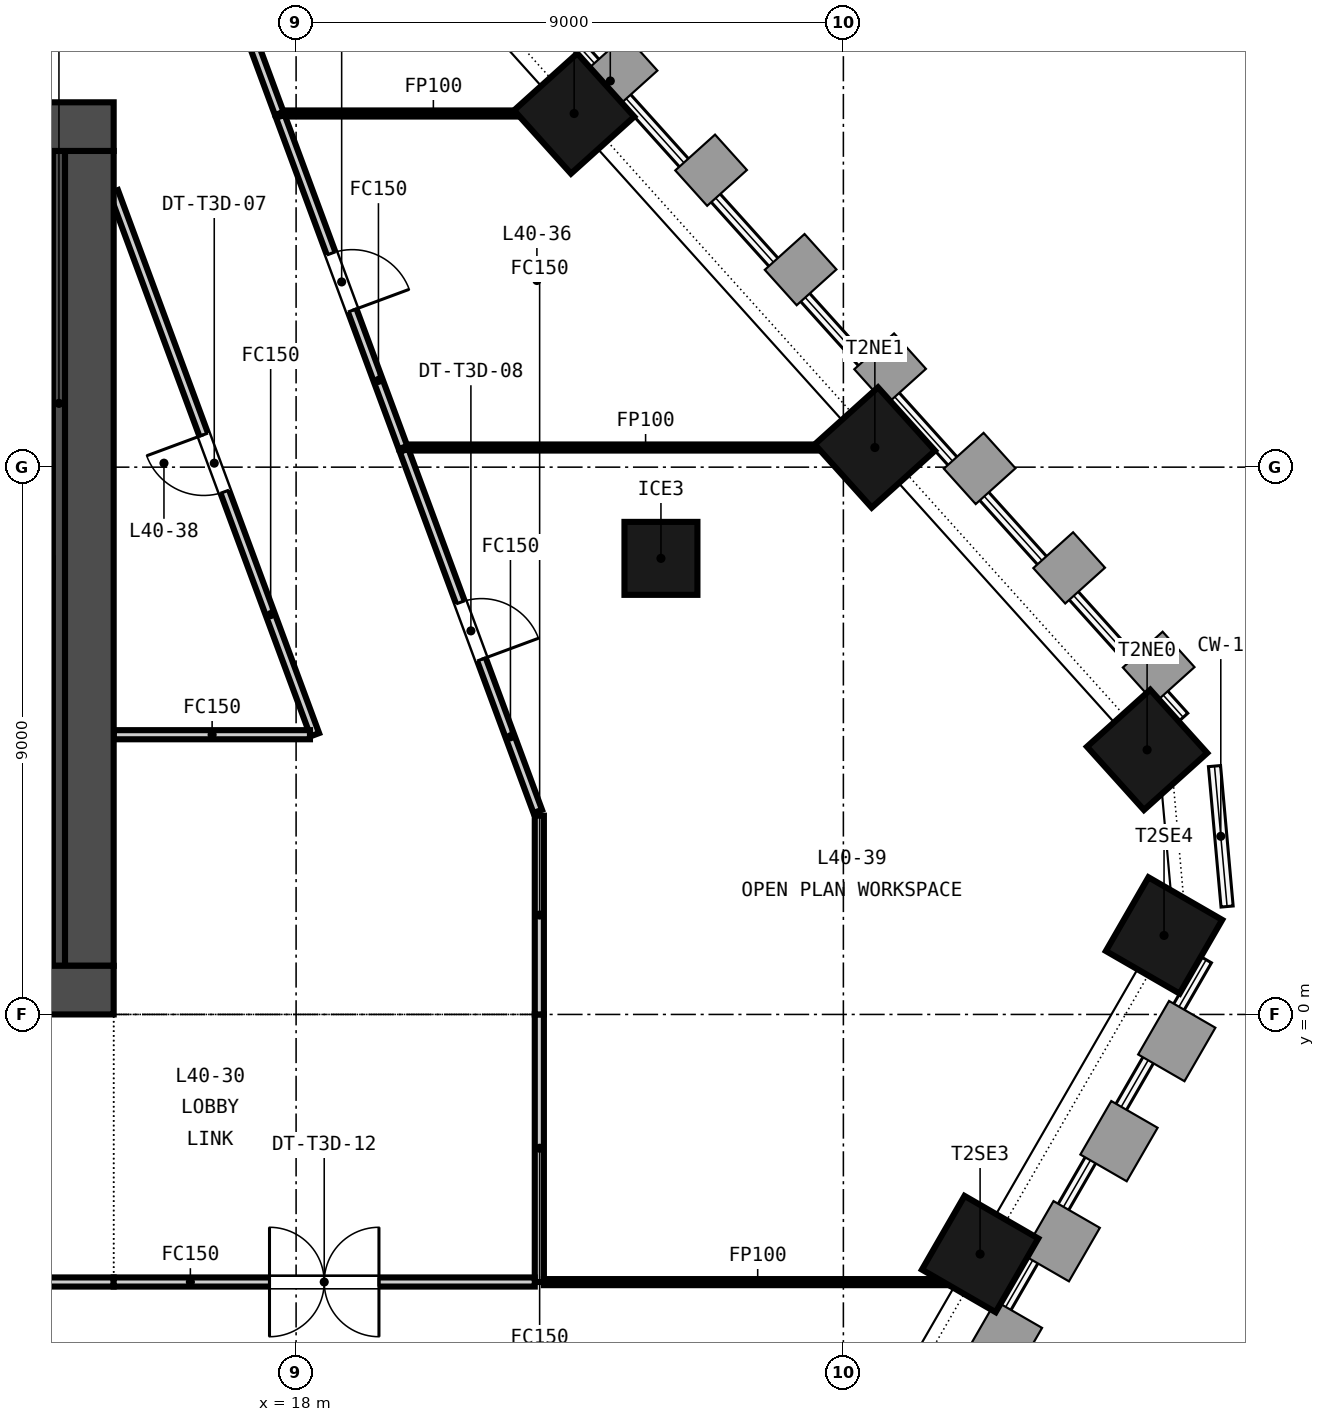
"""IFC4 building model, lengths in metres.
Left out: names, types, materials, properties, quantities, classifications, styles, units other than length and angle.
Written with IfcOpenShell. Run it as: python <this file> out.ifc"""

import sys

from ifc_helpers import new_model, si_unit, direction, frame, frame_2d, origin, origin_2d, place, context, subcontext, project, spatial, rectangle, extrude, element, fill, save


model = new_model("IFC4")
c1 = context("Model", 3, precision=1e-05, world=origin(), true_north=direction((0.0, 1.0)))
c2 = subcontext(c1, "Body", "Model", "MODEL_VIEW")
j1 = project(units=[si_unit("LENGTHUNIT", "METRE"), si_unit("PLANEANGLEUNIT", "RADIAN")], contexts=[c1])
p1 = place(None, origin())
s1 = spatial("IfcSite", under=j1, at=p1, CompositionType="ELEMENT")
p2 = place(p1, origin())
s2 = spatial("IfcBuilding", under=s1, at=p2, CompositionType="ELEMENT")
p3 = place(p2, frame((0.0, 0.0, 162.65)))
s3 = spatial("IfcBuildingStorey", under=s2, at=p3, CompositionType="ELEMENT", Elevation=162.65)
p4 = place(p3, frame((-15.0, 0.4, -0.15), z_axis=(0.0, 0.0, 1.0), x_axis=(1.0, 0.0, 0.0)))
e1 = element("IfcWall", 1, at=p4, inside=s3, PredefinedType="SOLIDWALL", context=c2, shape_type="SweptSolid", body=[
    extrude(rectangle(XDim=30.0, YDim=0.8, at=frame_2d((15.0, 0.0))), origin(), (0.0, 0.0, 1.0), 3.5),
])
p5 = place(p4, frame((5.8, 0.0, 0.15)))
e2 = element("IfcOpeningElement", 2, at=p5, cuts=e1, PredefinedType="OPENING", context=c2, shape_type="SweptSolid", body=[
    extrude(rectangle(XDim=2.4, YDim=2.4, at=frame_2d((1.2, 1.2))), frame((0.0, 0.41, 0.0), z_axis=(0.0, -1.0, 0.0), x_axis=(1.0, 0.0, 0.0)), (0.0, 0.0, 1.0), 0.82),
])
p6 = place(p4, frame((13.8, 0.0, 0.15)))
e3 = element("IfcOpeningElement", 3, at=p6, cuts=e1, PredefinedType="OPENING", context=c2, shape_type="SweptSolid", body=[
    extrude(rectangle(XDim=2.4, YDim=2.4, at=frame_2d((1.2, 1.2))), frame((0.0, 0.41, 0.0), z_axis=(0.0, -1.0, 0.0), x_axis=(1.0, 0.0, 0.0)), (0.0, 0.0, 1.0), 0.82),
])
p7 = place(p4, frame((21.8, 0.0, 0.15)))
e4 = element("IfcOpeningElement", 4, at=p7, cuts=e1, PredefinedType="OPENING", context=c2, shape_type="SweptSolid", body=[
    extrude(rectangle(XDim=2.4, YDim=2.4, at=frame_2d((1.2, 1.2))), frame((0.0, 0.41, 0.0), z_axis=(0.0, -1.0, 0.0), x_axis=(1.0, 0.0, 0.0)), (0.0, 0.0, 1.0), 0.82),
])
p8 = place(p4, frame((1.5, 0.0, 0.15)))
e5 = element("IfcOpeningElement", 5, at=p8, cuts=e1, PredefinedType="OPENING", context=c2, shape_type="SweptSolid", body=[
    extrude(rectangle(XDim=1.2, YDim=2.1, at=frame_2d((0.6, 1.05))), frame((0.0, 0.41, 0.0), z_axis=(0.0, -1.0, 0.0), x_axis=(1.0, 0.0, 0.0)), (0.0, 0.0, 1.0), 0.82),
])
p9 = place(p4, frame((27.3, 0.0, 0.15)))
e6 = element("IfcOpeningElement", 6, at=p9, cuts=e1, PredefinedType="OPENING", context=c2, shape_type="SweptSolid", body=[
    extrude(rectangle(XDim=1.2, YDim=2.1, at=frame_2d((0.6, 1.05))), frame((0.0, 0.41, 0.0), z_axis=(0.0, -1.0, 0.0), x_axis=(1.0, 0.0, 0.0)), (0.0, 0.0, 1.0), 0.82),
])
p10 = place(p3, frame((-15.0, 14.6, -0.15), z_axis=(0.0, 0.0, 1.0), x_axis=(1.0, 0.0, 0.0)))
e7 = element("IfcWall", 7, at=p10, inside=s3, PredefinedType="SOLIDWALL", context=c2, shape_type="SweptSolid", body=[
    extrude(rectangle(XDim=30.0, YDim=0.8, at=frame_2d((15.0, 0.0))), origin(), (0.0, 0.0, 1.0), 3.5),
])
p11 = place(p10, frame((9.25, 0.0, 0.15)))
e8 = element("IfcOpeningElement", 8, at=p11, cuts=e7, PredefinedType="OPENING", context=c2, shape_type="SweptSolid", body=[
    extrude(rectangle(XDim=1.5, YDim=2.1, at=frame_2d((0.75, 1.05))), frame((0.0, 0.41, 0.0), z_axis=(0.0, -1.0, 0.0), x_axis=(1.0, 0.0, 0.0)), (0.0, 0.0, 1.0), 0.82),
])
p12 = place(p10, frame((19.4, 0.0, 0.15)))
e9 = element("IfcOpeningElement", 9, at=p12, cuts=e7, PredefinedType="OPENING", context=c2, shape_type="SweptSolid", body=[
    extrude(rectangle(XDim=1.5, YDim=2.1, at=frame_2d((0.75, 1.05))), frame((0.0, 0.41, 0.0), z_axis=(0.0, -1.0, 0.0), x_axis=(1.0, 0.0, 0.0)), (0.0, 0.0, 1.0), 0.82),
])
p13 = place(p10, frame((1.5, 0.0, 0.15)))
e10 = element("IfcOpeningElement", 10, at=p13, cuts=e7, PredefinedType="OPENING", context=c2, shape_type="SweptSolid", body=[
    extrude(rectangle(XDim=1.2, YDim=2.1, at=frame_2d((0.6, 1.05))), frame((0.0, 0.41, 0.0), z_axis=(0.0, -1.0, 0.0), x_axis=(1.0, 0.0, 0.0)), (0.0, 0.0, 1.0), 0.82),
])
p14 = place(p10, frame((27.3, 0.0, 0.15)))
e11 = element("IfcOpeningElement", 11, at=p14, cuts=e7, PredefinedType="OPENING", context=c2, shape_type="SweptSolid", body=[
    extrude(rectangle(XDim=1.2, YDim=2.1, at=frame_2d((0.6, 1.05))), frame((0.0, 0.41, 0.0), z_axis=(0.0, -1.0, 0.0), x_axis=(1.0, 0.0, 0.0)), (0.0, 0.0, 1.0), 0.82),
])
p15 = place(p3, frame((14.6, 0.8, -0.15), z_axis=(0.0, 0.0, 1.0), x_axis=(0.0, 1.0, 0.0)))
e12 = element("IfcWall", 12, at=p15, inside=s3, PredefinedType="SOLIDWALL", context=c2, shape_type="SweptSolid", body=[
    extrude(rectangle(XDim=13.4, YDim=0.8, at=frame_2d((6.7, 0.0))), origin(), (0.0, 0.0, 1.0), 3.5),
])
for number, where, z_axis, x_axis in (
    (13, (29.248, -3.94, -0.15), (0.0, 0.0, 1.0), (0.5, 0.866, 0.0)),
    (14, (32.273, 1.299, -0.15), (0.0, 0.0, 1.0), (0.5, 0.866, 0.0)),
    (15, (31.995, 4.351, -0.15), (0.0, 0.0, 1.0), (-0.669, 0.743, 0.0)),
    (16, (27.518, 9.323, -0.15), (0.0, 0.0, 1.0), (-0.669, 0.743, 0.0)),
    (17, (22.573, 14.816, -0.15), (0.0, 0.0, 1.0), (-0.669, 0.743, 0.0)),
):
    element("IfcColumn", number, at=place(p3, frame(where, z_axis=z_axis, x_axis=x_axis)), inside=s3, PredefinedType="COLUMN", context=c2, shape_type="SweptSolid", body=[
        extrude(rectangle(XDim=1.4, YDim=1.4, at=origin_2d()), origin(), (0.0, 0.0, 1.0), 3.5),
    ])
p16 = place(p3, frame((24.0, 7.5, -0.15), z_axis=(0.0, 0.0, 1.0), x_axis=(1.0, 0.0, 0.0)))
e18 = element("IfcColumn", 18, at=p16, inside=s3, PredefinedType="COLUMN", context=c2, shape_type="SweptSolid", body=[
    extrude(rectangle(XDim=1.2, YDim=1.2, at=origin_2d()), origin(), (0.0, 0.0, 1.0), 3.5),
])
p17 = place(p3, frame((11.05, 7.35, 0.0), z_axis=(0.0, 0.0, 1.0), x_axis=(1.0, 0.0, 0.0)))
e19 = element("IfcWall", 19, at=p17, inside=s3, PredefinedType="SOLIDWALL", context=c2, shape_type="SweptSolid", body=[
    extrude(rectangle(XDim=2.95, YDim=0.3, at=frame_2d((1.475, 0.0))), origin(), (0.0, 0.0, 1.0), 3.35),
])
p18 = place(p3, frame((14.1, 0.8, 0.0), z_axis=(0.0, 0.0, 1.0), x_axis=(0.0, 1.0, 0.0)))
e20 = element("IfcWall", 20, at=p18, inside=s3, PredefinedType="SOLIDWALL", context=c2, shape_type="SweptSolid", body=[
    extrude(rectangle(XDim=13.4, YDim=0.2, at=frame_2d((6.7, 0.0))), origin(), (0.0, 0.0, 1.0), 3.35),
])
p19 = place(p3, frame((15.0, -4.4, 0.0), z_axis=(0.0, 0.0, 1.0), x_axis=(-1.0, 0.0, 0.0)))
e21 = element("IfcWall", 21, at=p19, inside=s3, PredefinedType="PARTITIONING", context=c2, shape_type="SweptSolid", body=[
    extrude(rectangle(XDim=10.505, YDim=0.15, at=frame_2d((5.252, 0.0))), origin(), (0.0, 0.0, 1.0), 2.591),
])
p20 = place(p19, frame((4.353, 0.0, 0.0)))
e22 = element("IfcOpeningElement", 22, at=p20, cuts=e21, PredefinedType="OPENING", context=c2, shape_type="SweptSolid", body=[
    extrude(rectangle(XDim=1.8, YDim=2.1, at=frame_2d((0.9, 1.05))), frame((0.0, 0.085, 0.0), z_axis=(0.0, -1.0, 0.0), x_axis=(1.0, 0.0, 0.0)), (0.0, 0.0, 1.0), 0.17),
])
p21 = place(p3, frame((22.0, 0.0, 0.0), z_axis=(0.0, 0.0, 1.0), x_axis=(0.0, -1.0, 0.0)))
e23 = element("IfcWall", 23, at=p21, inside=s3, PredefinedType="PARTITIONING", context=c2, shape_type="SweptSolid", body=[
    extrude(rectangle(XDim=4.4, YDim=0.15, at=frame_2d((2.2, 0.0))), origin(), (0.0, 0.0, 1.0), 2.591),
])
p22 = place(p3, frame((21.925, -4.4, 0.0), z_axis=(0.0, 0.0, 1.0), x_axis=(-1.0, 0.0, 0.0)))
e24 = element("IfcWall", 24, at=p22, inside=s3, PredefinedType="PARTITIONING", context=c2, shape_type="SweptSolid", body=[
    extrude(rectangle(XDim=6.925, YDim=0.15, at=frame_2d((3.462, 0.0))), origin(), (0.0, 0.0, 1.0), 2.591),
])
p23 = place(p22, frame((2.562, 0.0, 0.0)))
e25 = element("IfcOpeningElement", 25, at=p23, cuts=e24, PredefinedType="OPENING", context=c2, shape_type="SweptSolid", body=[
    extrude(rectangle(XDim=1.8, YDim=2.1, at=frame_2d((0.9, 1.05))), frame((0.0, 0.085, 0.0), z_axis=(0.0, -1.0, 0.0), x_axis=(1.0, 0.0, 0.0)), (0.0, 0.0, 1.0), 0.17),
])
p24 = place(p3, frame((18.308, 4.6, 0.0), z_axis=(0.0, 0.0, 1.0), x_axis=(-0.347347751601, 0.937736391241, 0.0)))
e26 = element("IfcWall", 26, at=p24, inside=s3, PredefinedType="PARTITIONING", context=c2, shape_type="SweptSolid", body=[
    extrude(rectangle(XDim=9.524, YDim=0.15, at=frame_2d((4.762, 0.0))), origin(), (0.0, 0.0, 1.0), 2.591),
])
p25 = place(p24, frame((4.262, 0.0, 0.0)))
e27 = element("IfcOpeningElement", 27, at=p25, cuts=e26, PredefinedType="OPENING", context=c2, shape_type="SweptSolid", body=[
    extrude(rectangle(XDim=1.0, YDim=2.1, at=frame_2d((0.5, 1.05))), frame((0.0, 0.085, 0.0), z_axis=(0.0, -1.0, 0.0), x_axis=(1.0, 0.0, 0.0)), (0.0, 0.0, 1.0), 0.17),
])
p26 = place(p3, frame((22.0, 3.269, 0.0), z_axis=(0.0, 0.0, 1.0), x_axis=(0.0, -1.0, 0.0)))
e28 = element("IfcWall", 28, at=p26, inside=s3, PredefinedType="PARTITIONING", context=c2, shape_type="SweptSolid", body=[
    extrude(rectangle(XDim=3.269, YDim=0.15, at=frame_2d((1.635, 0.0))), origin(), (0.0, 0.0, 1.0), 2.591),
])
p27 = place(p3, frame((16.57, 17.93, 0.0), z_axis=(0.0, 0.0, 1.0), x_axis=(0.34720419289, -0.937789554452, 0.0)))
e29 = element("IfcWall", 29, at=p27, inside=s3, PredefinedType="PARTITIONING", context=c2, shape_type="SweptSolid", body=[
    extrude(rectangle(XDim=3.32, YDim=0.15, at=frame_2d((1.66, 0.0))), origin(), (0.0, 0.0, 1.0), 2.591),
])
p28 = place(p3, frame((17.798, 14.816, 0.0), z_axis=(0.0, 0.0, 1.0), x_axis=(1.0, 0.0, 0.0)))
e30 = element("IfcWall", 30, at=p28, inside=s3, PredefinedType="PARTITIONING", context=c2, shape_type="SweptSolid", body=[
    extrude(rectangle(XDim=4.909, YDim=0.1, at=frame_2d((2.455, 0.0))), origin(), (0.0, 0.0, 1.0), 2.591),
])
p29 = place(p3, frame((17.74, 14.769, 0.0), z_axis=(0.0, 0.0, 1.0), x_axis=(0.347393763434, -0.937719346674, 0.0)))
e31 = element("IfcWall", 31, at=p29, inside=s3, PredefinedType="PARTITIONING", context=c2, shape_type="SweptSolid", body=[
    extrude(rectangle(XDim=5.808, YDim=0.15, at=frame_2d((2.904, 0.0))), origin(), (0.0, 0.0, 1.0), 2.591),
])
p30 = place(p29, frame((2.404, 0.0, 0.0)))
e32 = element("IfcOpeningElement", 32, at=p30, cuts=e31, PredefinedType="OPENING", context=c2, shape_type="SweptSolid", body=[
    extrude(rectangle(XDim=1.0, YDim=2.1, at=frame_2d((0.5, 1.05))), frame((0.0, 0.085, 0.0), z_axis=(0.0, -1.0, 0.0), x_axis=(1.0, 0.0, 0.0)), (0.0, 0.0, 1.0), 0.17),
])
p31 = place(p3, frame((19.833, 9.323, 0.0), z_axis=(0.0, 0.0, 1.0), x_axis=(1.0, 0.0, 0.0)))
e33 = element("IfcWall", 33, at=p31, inside=s3, PredefinedType="PARTITIONING", context=c2, shape_type="SweptSolid", body=[
    extrude(rectangle(XDim=7.819, YDim=0.1, at=frame_2d((3.91, 0.0))), origin(), (0.0, 0.0, 1.0), 2.591),
])
p32 = place(p3, frame((15.0, 4.6, 0.0), z_axis=(0.0, 0.0, 1.0), x_axis=(1.0, 0.0, 0.0)))
e34 = element("IfcWall", 34, at=p32, inside=s3, PredefinedType="PARTITIONING", context=c2, shape_type="SweptSolid", body=[
    extrude(rectangle(XDim=3.228, YDim=0.15, at=frame_2d((1.614, 0.0))), origin(), (0.0, 0.0, 1.0), 2.591),
])
p33 = place(p3, frame((19.775, 9.276, 0.0), z_axis=(0.0, 0.0, 1.0), x_axis=(0.347304307854, -0.937752482133, 0.0)))
e35 = element("IfcWall", 35, at=p33, inside=s3, PredefinedType="PARTITIONING", context=c2, shape_type="SweptSolid", body=[
    extrude(rectangle(XDim=6.331, YDim=0.15, at=frame_2d((3.166, 0.0))), origin(), (0.0, 0.0, 1.0), 2.591),
])
p34 = place(p33, frame((2.665, 0.0, 0.0)))
e36 = element("IfcOpeningElement", 36, at=p34, cuts=e35, PredefinedType="OPENING", context=c2, shape_type="SweptSolid", body=[
    extrude(rectangle(XDim=1.0, YDim=2.1, at=frame_2d((0.5, 1.05))), frame((0.0, 0.085, 0.0), z_axis=(0.0, -1.0, 0.0), x_axis=(1.0, 0.0, 0.0)), (0.0, 0.0, 1.0), 0.17),
])
p35 = place(p3, frame((22.075, -4.402, 0.0), z_axis=(0.0, 0.0, 1.0), x_axis=(1.0, 0.0, 0.0)))
e37 = element("IfcWall", 37, at=p35, inside=s3, PredefinedType="PARTITIONING", context=c2, shape_type="SweptSolid", body=[
    extrude(rectangle(XDim=7.022, YDim=0.1, at=frame_2d((3.511, 0.0))), origin(), (0.0, 0.0, 1.0), 2.591),
])
p36 = place(p30, origin())
e38 = element("IfcDoor", 38, at=p36, inside=s3, OperationType="SINGLE_SWING_RIGHT", PredefinedType="DOOR", context=c2, shape_type="SweptSolid", body=[
    extrude(rectangle(XDim=1.0, YDim=2.1, at=frame_2d((0.5, 1.05))), frame((0.0, 0.025, 0.0), z_axis=(0.0, -1.0, 0.0), x_axis=(1.0, 0.0, 0.0)), (0.0, 0.0, 1.0), 0.05),
])
fill(e32, e38)
p37 = place(p25, origin())
e39 = element("IfcDoor", 39, at=p37, inside=s3, OperationType="SINGLE_SWING_RIGHT", PredefinedType="DOOR", context=c2, shape_type="SweptSolid", body=[
    extrude(rectangle(XDim=1.0, YDim=2.1, at=frame_2d((0.5, 1.05))), frame((0.0, 0.025, 0.0), z_axis=(0.0, -1.0, 0.0), x_axis=(1.0, 0.0, 0.0)), (0.0, 0.0, 1.0), 0.05),
])
fill(e27, e39)
p38 = place(p34, origin())
e40 = element("IfcDoor", 40, at=p38, inside=s3, OperationType="SINGLE_SWING_RIGHT", PredefinedType="DOOR", context=c2, shape_type="SweptSolid", body=[
    extrude(rectangle(XDim=1.0, YDim=2.1, at=frame_2d((0.5, 1.05))), frame((0.0, 0.025, 0.0), z_axis=(0.0, -1.0, 0.0), x_axis=(1.0, 0.0, 0.0)), (0.0, 0.0, 1.0), 0.05),
])
fill(e36, e40)
p39 = place(p23, origin())
e41 = element("IfcDoor", 41, at=p39, inside=s3, OperationType="DOUBLE_DOOR_DOUBLE_SWING", PredefinedType="DOOR", context=c2, shape_type="SweptSolid", body=[
    extrude(rectangle(XDim=1.8, YDim=2.1, at=frame_2d((0.9, 1.05))), frame((0.0, 0.025, 0.0), z_axis=(0.0, -1.0, 0.0), x_axis=(1.0, 0.0, 0.0)), (0.0, 0.0, 1.0), 0.05),
])
fill(e25, e41)
save(model, sys.argv[1])
